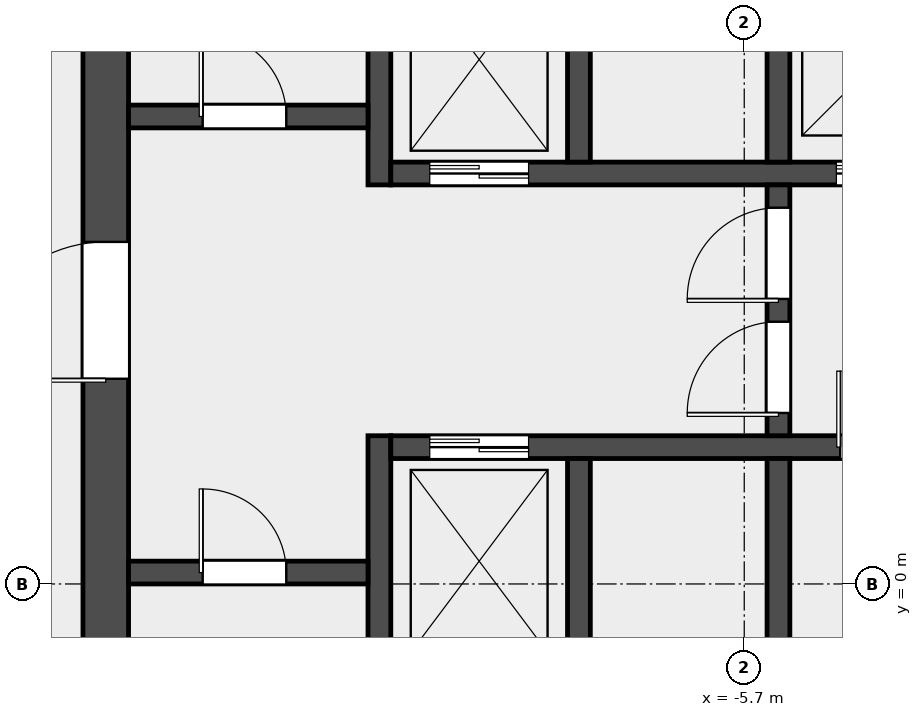
"""IFC4 building model, lengths in metres.
Left out: names, types, materials, properties, quantities, classifications, styles, units other than length and angle.
Written with IfcOpenShell. Run it as: python <this file> out.ifc"""

import sys

from ifc_helpers import new_model, si_unit, direction, frame, frame_2d, origin, place, context, subcontext, project, spatial, rectangle, extrude, element, fill, save


model = new_model("IFC4")
c1 = context("Model", 3, precision=1e-05, world=origin(), true_north=direction((0.0, 1.0)))
c2 = subcontext(c1, "Body", "Model", "MODEL_VIEW")
j1 = project(units=[si_unit("LENGTHUNIT", "METRE"), si_unit("PLANEANGLEUNIT", "RADIAN")], contexts=[c1])
p1 = place(None, origin())
s1 = spatial("IfcSite", under=j1, at=p1, CompositionType="ELEMENT")
p2 = place(p1, origin())
s2 = spatial("IfcBuilding", under=s1, at=p2, CompositionType="ELEMENT")
p3 = place(p2, frame((0.0, 0.0, 329.4)))
s3 = spatial("IfcBuildingStorey", under=s2, at=p3, CompositionType="ELEMENT", Elevation=329.4)
p4 = place(p3, frame((-14.1, -6.6, 0.0), z_axis=(0.0, 0.0, 1.0), x_axis=(0.0, 1.0, 0.0)))
e1 = element("IfcWall", 1, at=p4, inside=s3, PredefinedType="SHEAR", context=c2, shape_type="SweptSolid", body=[
    extrude(rectangle(XDim=19.5, YDim=0.6, at=frame_2d((9.75, 0.0))), origin(), (0.0, 0.0, 1.0), 3.7),
])
p5 = place(p4, frame((9.3, 0.0, 0.0)))
e2 = element("IfcOpeningElement", 2, at=p5, cuts=e1, PredefinedType="OPENING", context=c2, shape_type="SweptSolid", body=[
    extrude(rectangle(XDim=1.8, YDim=2.1, at=frame_2d((0.9, 1.05))), frame((0.0, 0.312, 0.0), z_axis=(0.0, -1.0, 0.0), x_axis=(1.0, 0.0, 0.0)), (0.0, 0.0, 1.0), 0.624),
])
p6 = place(p3, frame((-10.5, -6.6, 0.0), z_axis=(0.0, 0.0, 1.0), x_axis=(0.0, 1.0, 0.0)))
e3 = element("IfcWall", 3, at=p6, inside=s3, PredefinedType="SHEAR", context=c2, shape_type="SweptSolid", body=[
    extrude(rectangle(XDim=8.55, YDim=0.3, at=frame_2d((4.275, 0.0))), origin(), (0.0, 0.0, 1.0), 3.7),
])
p7 = place(p3, frame((-10.5, 5.25, 0.0), z_axis=(0.0, 0.0, 1.0), x_axis=(0.0, 1.0, 0.0)))
e4 = element("IfcWall", 4, at=p7, inside=s3, PredefinedType="SHEAR", context=c2, shape_type="SweptSolid", body=[
    extrude(rectangle(XDim=7.65, YDim=0.3, at=frame_2d((3.825, 0.0))), origin(), (0.0, 0.0, 1.0), 3.7),
])
p8 = place(p3, frame((-13.8, 0.15, 0.0), z_axis=(0.0, 0.0, 1.0), x_axis=(1.0, 0.0, 0.0)))
e5 = element("IfcWall", 5, at=p8, inside=s3, PredefinedType="SOLIDWALL", context=c2, shape_type="SweptSolid", body=[
    extrude(rectangle(XDim=3.15, YDim=0.3, at=frame_2d((1.575, 0.0))), origin(), (0.0, 0.0, 1.0), 3.7),
])
p9 = place(p8, frame((0.975, 0.0, 0.0)))
e6 = element("IfcOpeningElement", 6, at=p9, cuts=e5, PredefinedType="OPENING", context=c2, shape_type="SweptSolid", body=[
    extrude(rectangle(XDim=1.1, YDim=2.1, at=frame_2d((0.55, 1.05))), frame((0.0, 0.162, 0.0), z_axis=(0.0, -1.0, 0.0), x_axis=(1.0, 0.0, 0.0)), (0.0, 0.0, 1.0), 0.324),
])
p10 = place(p3, frame((-13.8, 6.15, 0.0), z_axis=(0.0, 0.0, 1.0), x_axis=(1.0, 0.0, 0.0)))
e7 = element("IfcWall", 7, at=p10, inside=s3, PredefinedType="SOLIDWALL", context=c2, shape_type="SweptSolid", body=[
    extrude(rectangle(XDim=3.15, YDim=0.3, at=frame_2d((1.575, 0.0))), origin(), (0.0, 0.0, 1.0), 3.7),
])
p11 = place(p10, frame((0.975, 0.0, 0.0)))
e8 = element("IfcOpeningElement", 8, at=p11, cuts=e7, PredefinedType="OPENING", context=c2, shape_type="SweptSolid", body=[
    extrude(rectangle(XDim=1.1, YDim=2.1, at=frame_2d((0.55, 1.05))), frame((0.0, 0.162, 0.0), z_axis=(0.0, -1.0, 0.0), x_axis=(1.0, 0.0, 0.0)), (0.0, 0.0, 1.0), 0.324),
])
p12 = place(p3, frame((-10.35, 1.8, 0.0), z_axis=(0.0, 0.0, 1.0), x_axis=(1.0, 0.0, 0.0)))
e9 = element("IfcWall", 9, at=p12, inside=s3, PredefinedType="SOLIDWALL", context=c2, shape_type="SweptSolid", body=[
    extrude(rectangle(XDim=20.7, YDim=0.3, at=frame_2d((10.35, 0.0))), origin(), (0.0, 0.0, 1.0), 3.7),
])
p13 = place(p12, frame((0.512, 0.0, 0.0)))
e10 = element("IfcOpeningElement", 10, at=p13, cuts=e9, PredefinedType="OPENING", context=c2, shape_type="SweptSolid", body=[
    extrude(rectangle(XDim=1.3, YDim=2.1, at=frame_2d((0.65, 1.05))), frame((0.0, 0.162, 0.0), z_axis=(0.0, -1.0, 0.0), x_axis=(1.0, 0.0, 0.0)), (0.0, 0.0, 1.0), 0.324),
])
p14 = place(p12, frame((5.913, 0.0, 0.0)))
e11 = element("IfcOpeningElement", 11, at=p14, cuts=e9, PredefinedType="OPENING", context=c2, shape_type="SweptSolid", body=[
    extrude(rectangle(XDim=1.0, YDim=2.1, at=frame_2d((0.5, 1.05))), frame((0.0, 0.162, 0.0), z_axis=(0.0, -1.0, 0.0), x_axis=(1.0, 0.0, 0.0)), (0.0, 0.0, 1.0), 0.324),
])
p15 = place(p12, frame((13.788, 0.0, 0.0)))
e12 = element("IfcOpeningElement", 12, at=p15, cuts=e9, PredefinedType="OPENING", context=c2, shape_type="SweptSolid", body=[
    extrude(rectangle(XDim=1.0, YDim=2.1, at=frame_2d((0.5, 1.05))), frame((0.0, 0.162, 0.0), z_axis=(0.0, -1.0, 0.0), x_axis=(1.0, 0.0, 0.0)), (0.0, 0.0, 1.0), 0.324),
])
p16 = place(p3, frame((-10.35, 5.4, 0.0), z_axis=(0.0, 0.0, 1.0), x_axis=(1.0, 0.0, 0.0)))
e13 = element("IfcWall", 13, at=p16, inside=s3, PredefinedType="SOLIDWALL", context=c2, shape_type="SweptSolid", body=[
    extrude(rectangle(XDim=20.7, YDim=0.3, at=frame_2d((10.35, 0.0))), origin(), (0.0, 0.0, 1.0), 3.7),
])
p17 = place(p16, frame((0.512, 0.0, 0.0)))
e14 = element("IfcOpeningElement", 14, at=p17, cuts=e13, PredefinedType="OPENING", context=c2, shape_type="SweptSolid", body=[
    extrude(rectangle(XDim=1.3, YDim=2.1, at=frame_2d((0.65, 1.05))), frame((0.0, 0.162, 0.0), z_axis=(0.0, -1.0, 0.0), x_axis=(1.0, 0.0, 0.0)), (0.0, 0.0, 1.0), 0.324),
])
p18 = place(p16, frame((5.863, 0.0, 0.0)))
e15 = element("IfcOpeningElement", 15, at=p18, cuts=e13, PredefinedType="OPENING", context=c2, shape_type="SweptSolid", body=[
    extrude(rectangle(XDim=1.1, YDim=2.1, at=frame_2d((0.55, 1.05))), frame((0.0, 0.162, 0.0), z_axis=(0.0, -1.0, 0.0), x_axis=(1.0, 0.0, 0.0)), (0.0, 0.0, 1.0), 0.324),
])
p19 = place(p16, frame((8.488, 0.0, 0.0)))
e16 = element("IfcOpeningElement", 16, at=p19, cuts=e13, PredefinedType="OPENING", context=c2, shape_type="SweptSolid", body=[
    extrude(rectangle(XDim=1.1, YDim=2.1, at=frame_2d((0.55, 1.05))), frame((0.0, 0.162, 0.0), z_axis=(0.0, -1.0, 0.0), x_axis=(1.0, 0.0, 0.0)), (0.0, 0.0, 1.0), 0.324),
])
p20 = place(p16, frame((11.113, 0.0, 0.0)))
e17 = element("IfcOpeningElement", 17, at=p20, cuts=e13, PredefinedType="OPENING", context=c2, shape_type="SweptSolid", body=[
    extrude(rectangle(XDim=1.1, YDim=2.1, at=frame_2d((0.55, 1.05))), frame((0.0, 0.162, 0.0), z_axis=(0.0, -1.0, 0.0), x_axis=(1.0, 0.0, 0.0)), (0.0, 0.0, 1.0), 0.324),
])
p21 = place(p16, frame((13.738, 0.0, 0.0)))
e18 = element("IfcOpeningElement", 18, at=p21, cuts=e13, PredefinedType="OPENING", context=c2, shape_type="SweptSolid", body=[
    extrude(rectangle(XDim=1.1, YDim=2.1, at=frame_2d((0.55, 1.05))), frame((0.0, 0.162, 0.0), z_axis=(0.0, -1.0, 0.0), x_axis=(1.0, 0.0, 0.0)), (0.0, 0.0, 1.0), 0.324),
])
p22 = place(p16, frame((16.363, 0.0, 0.0)))
e19 = element("IfcOpeningElement", 19, at=p22, cuts=e13, PredefinedType="OPENING", context=c2, shape_type="SweptSolid", body=[
    extrude(rectangle(XDim=1.1, YDim=2.1, at=frame_2d((0.55, 1.05))), frame((0.0, 0.162, 0.0), z_axis=(0.0, -1.0, 0.0), x_axis=(1.0, 0.0, 0.0)), (0.0, 0.0, 1.0), 0.324),
])
p23 = place(p16, frame((18.988, 0.0, 0.0)))
e20 = element("IfcOpeningElement", 20, at=p23, cuts=e13, PredefinedType="OPENING", context=c2, shape_type="SweptSolid", body=[
    extrude(rectangle(XDim=1.1, YDim=2.1, at=frame_2d((0.55, 1.05))), frame((0.0, 0.162, 0.0), z_axis=(0.0, -1.0, 0.0), x_axis=(1.0, 0.0, 0.0)), (0.0, 0.0, 1.0), 0.324),
])
for number, where, z_axis, x_axis in (
    (21, (-7.875, -1.05, 0.0), (0.0, 0.0, 1.0), (0.0, 1.0, 0.0)),
    (22, (-5.25, -1.05, 0.0), (0.0, 0.0, 1.0), (0.0, 1.0, 0.0)),
    (23, (-7.875, 5.55, 0.0), (0.0, 0.0, 1.0), (0.0, 1.0, 0.0)),
    (24, (-5.25, 5.55, 0.0), (0.0, 0.0, 1.0), (0.0, 1.0, 0.0)),
):
    element("IfcWall", number, at=place(p3, frame(where, z_axis=z_axis, x_axis=x_axis)), inside=s3, PredefinedType="SOLIDWALL", context=c2, shape_type="SweptSolid", body=[
        extrude(rectangle(XDim=2.7, YDim=0.3, at=frame_2d((1.35, 0.0))), origin(), (0.0, 0.0, 1.0), 3.7),
    ])
p24 = place(p3, frame((-5.25, 1.95, 0.0), z_axis=(0.0, 0.0, 1.0), x_axis=(0.0, 1.0, 0.0)))
e25 = element("IfcWall", 25, at=p24, inside=s3, PredefinedType="SOLIDWALL", context=c2, shape_type="SweptSolid", body=[
    extrude(rectangle(XDim=3.3, YDim=0.3, at=frame_2d((1.65, 0.0))), origin(), (0.0, 0.0, 1.0), 3.7),
])
p25 = place(p24, frame((0.3, 0.0, 0.0)))
e26 = element("IfcOpeningElement", 26, at=p25, cuts=e25, PredefinedType="OPENING", context=c2, shape_type="SweptSolid", body=[
    extrude(rectangle(XDim=1.2, YDim=2.1, at=frame_2d((0.6, 1.05))), frame((0.0, 0.162, 0.0), z_axis=(0.0, -1.0, 0.0), x_axis=(1.0, 0.0, 0.0)), (0.0, 0.0, 1.0), 0.324),
])
p26 = place(p24, frame((1.8, 0.0, 0.0)))
e27 = element("IfcOpeningElement", 27, at=p26, cuts=e25, PredefinedType="OPENING", context=c2, shape_type="SweptSolid", body=[
    extrude(rectangle(XDim=1.2, YDim=2.1, at=frame_2d((0.6, 1.05))), frame((0.0, 0.162, 0.0), z_axis=(0.0, -1.0, 0.0), x_axis=(1.0, 0.0, 0.0)), (0.0, 0.0, 1.0), 0.324),
])
p27 = place(p9, origin())
e28 = element("IfcDoor", 28, at=p27, inside=s3, OperationType="SINGLE_SWING_LEFT", PredefinedType="DOOR", context=c2, shape_type="SweptSolid", body=[
    extrude(rectangle(XDim=1.1, YDim=2.1, at=frame_2d((0.55, 1.05))), frame((0.0, 0.025, 0.0), z_axis=(0.0, -1.0, 0.0), x_axis=(1.0, 0.0, 0.0)), (0.0, 0.0, 1.0), 0.05),
])
fill(e6, e28)
p28 = place(p11, origin())
e29 = element("IfcDoor", 29, at=p28, inside=s3, OperationType="SINGLE_SWING_LEFT", PredefinedType="DOOR", context=c2, shape_type="SweptSolid", body=[
    extrude(rectangle(XDim=1.1, YDim=2.1, at=frame_2d((0.55, 1.05))), frame((0.0, 0.025, 0.0), z_axis=(0.0, -1.0, 0.0), x_axis=(1.0, 0.0, 0.0)), (0.0, 0.0, 1.0), 0.05),
])
fill(e8, e29)
p29 = place(p5, origin())
e30 = element("IfcDoor", 30, at=p29, inside=s3, OperationType="DOUBLE_DOOR_SINGLE_SWING", PredefinedType="DOOR", context=c2, shape_type="SweptSolid", body=[
    extrude(rectangle(XDim=1.8, YDim=2.1, at=frame_2d((0.9, 1.05))), frame((0.0, 0.025, 0.0), z_axis=(0.0, -1.0, 0.0), x_axis=(1.0, 0.0, 0.0)), (0.0, 0.0, 1.0), 0.05),
])
fill(e2, e30)
p30 = place(p25, origin())
e31 = element("IfcDoor", 31, at=p30, inside=s3, OperationType="SINGLE_SWING_LEFT", PredefinedType="DOOR", context=c2, shape_type="SweptSolid", body=[
    extrude(rectangle(XDim=1.2, YDim=2.1, at=frame_2d((0.6, 1.05))), frame((0.0, 0.025, 0.0), z_axis=(0.0, -1.0, 0.0), x_axis=(1.0, 0.0, 0.0)), (0.0, 0.0, 1.0), 0.05),
])
fill(e26, e31)
p31 = place(p26, origin())
e32 = element("IfcDoor", 32, at=p31, inside=s3, OperationType="SINGLE_SWING_RIGHT", PredefinedType="DOOR", context=c2, shape_type="SweptSolid", body=[
    extrude(rectangle(XDim=1.2, YDim=2.1, at=frame_2d((0.6, 1.05))), frame((0.0, 0.025, 0.0), z_axis=(0.0, -1.0, 0.0), x_axis=(1.0, 0.0, 0.0)), (0.0, 0.0, 1.0), 0.05),
])
fill(e27, e32)
p32 = place(p13, origin())
e33 = element("IfcDoor", 33, at=p32, inside=s3, OperationType="DOUBLE_DOOR_SLIDING", PredefinedType="DOOR", context=c2, shape_type="SweptSolid", body=[
    extrude(rectangle(XDim=1.3, YDim=2.1, at=frame_2d((0.65, 1.05))), frame((0.0, 0.025, 0.0), z_axis=(0.0, -1.0, 0.0), x_axis=(1.0, 0.0, 0.0)), (0.0, 0.0, 1.0), 0.05),
])
fill(e10, e33)
p33 = place(p17, origin())
e34 = element("IfcDoor", 34, at=p33, inside=s3, OperationType="DOUBLE_DOOR_SLIDING", PredefinedType="DOOR", context=c2, shape_type="SweptSolid", body=[
    extrude(rectangle(XDim=1.3, YDim=2.1, at=frame_2d((0.65, 1.05))), frame((0.0, 0.025, 0.0), z_axis=(0.0, -1.0, 0.0), x_axis=(1.0, 0.0, 0.0)), (0.0, 0.0, 1.0), 0.05),
])
fill(e14, e34)
p34 = place(p18, origin())
e35 = element("IfcDoor", 35, at=p34, inside=s3, OperationType="DOUBLE_DOOR_SLIDING", PredefinedType="DOOR", context=c2, shape_type="SweptSolid", body=[
    extrude(rectangle(XDim=1.1, YDim=2.1, at=frame_2d((0.55, 1.05))), frame((0.0, 0.025, 0.0), z_axis=(0.0, -1.0, 0.0), x_axis=(1.0, 0.0, 0.0)), (0.0, 0.0, 1.0), 0.05),
])
fill(e15, e35)
p35 = place(p14, origin())
e36 = element("IfcDoor", 36, at=p35, inside=s3, OperationType="SINGLE_SWING_LEFT", PredefinedType="DOOR", context=c2, shape_type="SweptSolid", body=[
    extrude(rectangle(XDim=1.0, YDim=2.1, at=frame_2d((0.5, 1.05))), frame((0.0, 0.025, 0.0), z_axis=(0.0, -1.0, 0.0), x_axis=(1.0, 0.0, 0.0)), (0.0, 0.0, 1.0), 0.05),
])
fill(e11, e36)
save(model, sys.argv[1])
